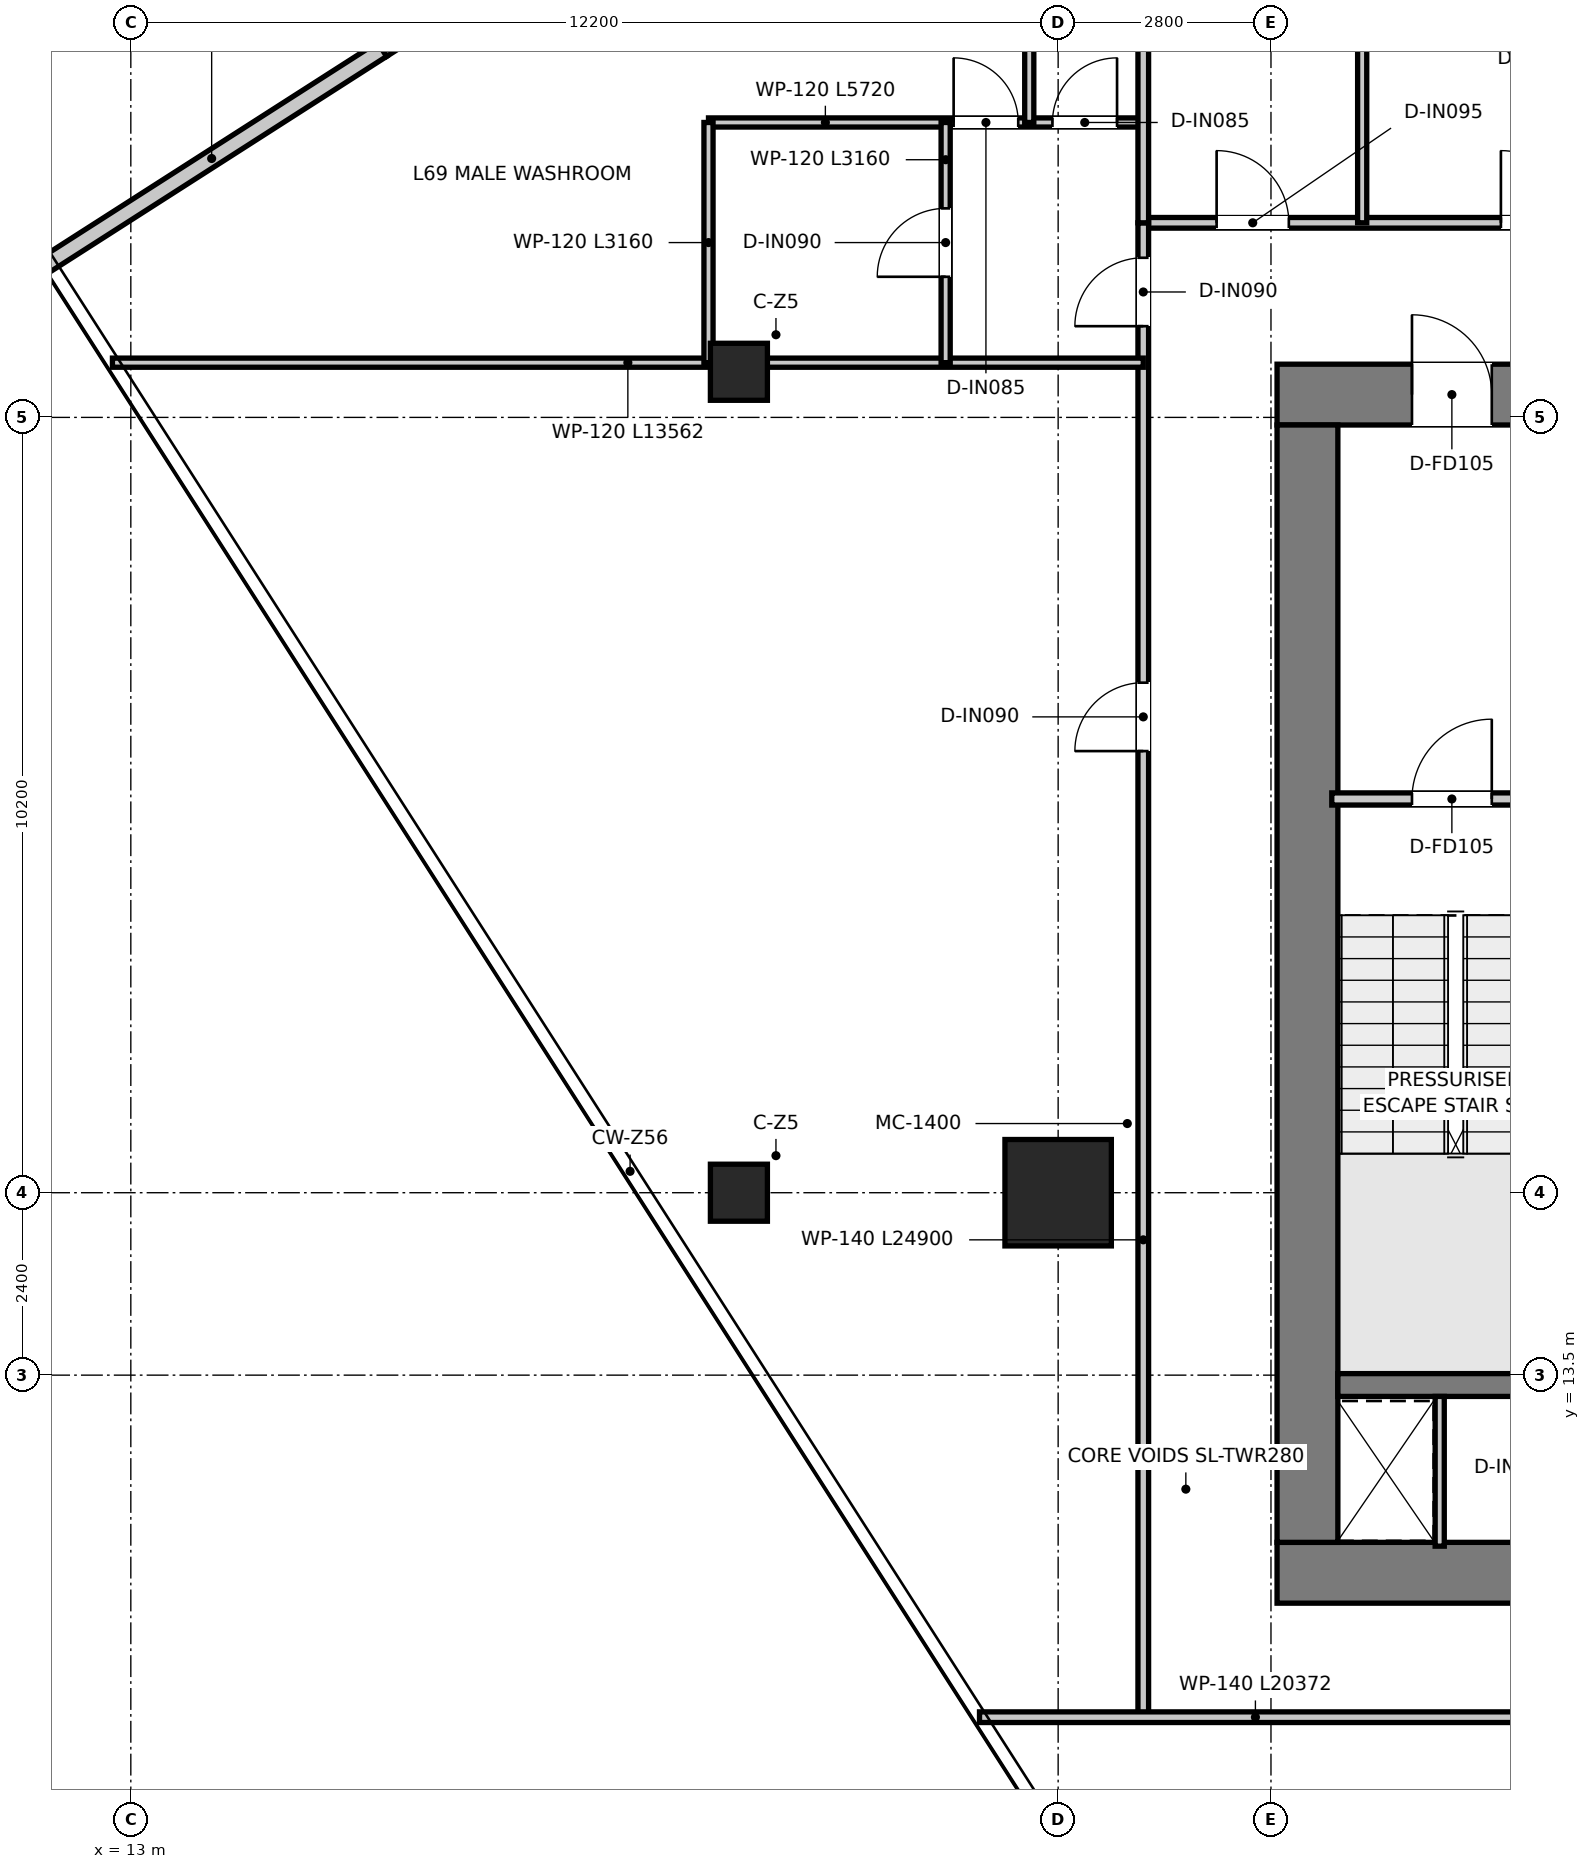
"""IFC4 building model, lengths in metres.
Left out: names, types, materials, properties, quantities, classifications, styles, units other than length and angle.
Written with IfcOpenShell. Run it as: python <this file> out.ifc"""

import sys

from ifc_helpers import new_model, si_unit, direction, frame, frame_2d, origin, origin_2d, place, context, subcontext, project, spatial, rectangle, extrude, source, transform, mapped, element, fill, save


model = new_model("IFC4")
c1 = context("Model", 3, precision=1e-05, world=origin(), true_north=direction((0.0, 1.0)))
c2 = subcontext(c1, "Body", "Model", "MODEL_VIEW")
j1 = project(units=[si_unit("LENGTHUNIT", "METRE"), si_unit("PLANEANGLEUNIT", "RADIAN")], contexts=[c1])
p1 = place(None, origin())
s1 = spatial("IfcSite", under=j1, at=p1, CompositionType="ELEMENT")
p2 = place(p1, origin())
s2 = spatial("IfcBuilding", under=s1, at=p2, CompositionType="ELEMENT")
p3 = place(p2, frame((0.0, 0.0, 283.2)))
s3 = spatial("IfcBuildingStorey", under=s2, at=p3, CompositionType="ELEMENT", Elevation=283.2)
p4 = place(p3, frame((28.08, 10.9, 0.0), z_axis=(0.0, 0.0, 1.0), x_axis=(1.0, 0.0, 0.0)))
e1 = element("IfcWall", 1, at=p4, inside=s3, PredefinedType="SHEAR", context=c2, shape_type="SweptSolid", body=[
    extrude(rectangle(XDim=15.84, YDim=0.8, at=frame_2d((7.92, 0.0))), origin(), (0.0, 0.0, 1.0), 3.95),
])
p5 = place(p3, frame((28.08, 26.4, 0.0), z_axis=(0.0, 0.0, 1.0), x_axis=(1.0, 0.0, 0.0)))
e2 = element("IfcWall", 2, at=p5, inside=s3, PredefinedType="SHEAR", context=c2, shape_type="SweptSolid", body=[
    extrude(rectangle(XDim=15.84, YDim=0.8, at=frame_2d((7.92, 0.0))), origin(), (0.0, 0.0, 1.0), 3.95),
])
p6 = place(p5, frame((7.22, 0.0, 0.0)))
e3 = element("IfcOpeningElement", 3, at=p6, cuts=e2, PredefinedType="OPENING", context=c2, shape_type="SweptSolid", body=[
    extrude(rectangle(XDim=1.4, YDim=2.2, at=frame_2d((0.7, 1.1))), frame((0.0, 0.41, 0.0), z_axis=(0.0, -1.0, 0.0), x_axis=(1.0, 0.0, 0.0)), (0.0, 0.0, 1.0), 0.82),
])
p7 = place(p5, frame((1.775, 0.0, 0.0)))
e4 = element("IfcOpeningElement", 4, at=p7, cuts=e2, PredefinedType="OPENING", context=c2, shape_type="SweptSolid", body=[
    extrude(rectangle(XDim=1.05, YDim=2.1, at=frame_2d((0.525, 1.05))), frame((0.0, 0.41, 0.0), z_axis=(0.0, -1.0, 0.0), x_axis=(1.0, 0.0, 0.0)), (0.0, 0.0, 1.0), 0.82),
])
p8 = place(p5, frame((13.015, 0.0, 0.0)))
e5 = element("IfcOpeningElement", 5, at=p8, cuts=e2, PredefinedType="OPENING", context=c2, shape_type="SweptSolid", body=[
    extrude(rectangle(XDim=1.05, YDim=2.1, at=frame_2d((0.525, 1.05))), frame((0.0, 0.41, 0.0), z_axis=(0.0, -1.0, 0.0), x_axis=(1.0, 0.0, 0.0)), (0.0, 0.0, 1.0), 0.82),
])
p9 = place(p3, frame((28.48, 11.3, 0.0), z_axis=(0.0, 0.0, 1.0), x_axis=(0.0, 1.0, 0.0)))
e6 = element("IfcWall", 6, at=p9, inside=s3, PredefinedType="SHEAR", context=c2, shape_type="SweptSolid", body=[
    extrude(rectangle(XDim=14.7, YDim=0.8, at=frame_2d((7.35, 0.0))), origin(), (0.0, 0.0, 1.0), 3.95),
])
p10 = place(p3, frame((28.88, 13.37, 0.0), z_axis=(0.0, 0.0, 1.0), x_axis=(1.0, 0.0, 0.0)))
e7 = element("IfcWall", 7, at=p10, inside=s3, PredefinedType="SHEAR", context=c2, shape_type="SweptSolid", body=[
    extrude(rectangle(XDim=3.1, YDim=0.3, at=frame_2d((1.55, 0.0))), origin(), (0.0, 0.0, 1.0), 3.95),
])
m1 = source(origin(), c2, "Body", "SweptSolid", [
    extrude(rectangle(XDim=1.4, YDim=1.4, at=origin_2d()), origin(), (0.0, 0.0, 1.0), 3.95),
])
p11 = place(p3, frame((25.2, 15.9, 0.0), z_axis=(0.0, 0.0, 1.0), x_axis=(1.0, 0.0, 0.0)))
e8 = element("IfcColumn", 8, at=p11, inside=s3, PredefinedType="USERDEFINED", context=c2, shape_type="MappedRepresentation", body=[
    mapped(m1, transform((0.0, 0.0, 0.0), x_axis=(1.0, 0.0, 0.0), y_axis=(0.0, 1.0, 0.0), z_axis=(0.0, 0.0, 1.0), scale=1.0)),
])
m2 = source(origin(), c2, "Body", "SweptSolid", [
    extrude(rectangle(XDim=0.75, YDim=0.75, at=origin_2d()), origin(), (0.0, 0.0, 1.0), 3.95),
])
for number, where, z_axis, x_axis in (
    (9, (21.0, 15.9, 0.0), (0.0, 0.0, 1.0), (1.0, 0.0, 0.0)),
    (10, (21.0, 26.7, 0.0), (0.0, 0.0, 1.0), (1.0, 0.0, 0.0)),
):
    element("IfcColumn", number, at=place(p3, frame(where, z_axis=z_axis, x_axis=x_axis)), inside=s3, PredefinedType="COLUMN", context=c2, shape_type="MappedRepresentation", body=[
        mapped(m2, transform((0.0, 0.0, 0.0), x_axis=(1.0, 0.0, 0.0), y_axis=(0.0, 1.0, 0.0), z_axis=(0.0, 0.0, 1.0), scale=1.0)),
    ])
p12 = place(p3, frame((13.468, 35.578, 0.0), z_axis=(0.0, 0.0, 1.0), x_axis=(0.539129907131, -0.842222620948, 0.0)))
e11 = element("IfcWall", 11, at=p12, inside=s3, PredefinedType="ELEMENTEDWALL", context=c2, shape_type="SweptSolid", body=[
    extrude(rectangle(XDim=5.545, YDim=0.22, at=frame_2d((2.772, 0.0))), origin(), (0.0, 0.0, 1.0), 3.67),
])
p13 = place(p3, frame((16.306, 30.941, 0.0), z_axis=(0.0, 0.0, 1.0), x_axis=(-0.84222560178, -0.539125250481, 0.0)))
e12 = element("IfcWall", 12, at=p13, inside=s3, PredefinedType="ELEMENTEDWALL", context=c2, shape_type="SweptSolid", body=[
    extrude(rectangle(XDim=5.325, YDim=0.22, at=frame_2d((2.663, 0.0))), origin(), (0.0, 0.0, 1.0), 3.67),
])
p14 = place(p3, frame((28.8, 21.08, 0.0), z_axis=(0.0, 0.0, 1.0), x_axis=(1.0, 0.0, 0.0)))
e13 = element("IfcWall", 13, at=p14, inside=s3, PredefinedType="PARTITIONING", context=c2, shape_type="SweptSolid", body=[
    extrude(rectangle(XDim=3.16, YDim=0.16, at=frame_2d((1.58, 0.0))), origin(), (0.0, 0.0, 1.0), 3.67),
])
p15 = place(p14, frame((1.055, 0.0, 0.0)))
e14 = element("IfcOpeningElement", 14, at=p15, cuts=e13, PredefinedType="OPENING", context=c2, shape_type="SweptSolid", body=[
    extrude(rectangle(XDim=1.05, YDim=2.1, at=frame_2d((0.525, 1.05))), frame((0.0, 0.09, 0.0), z_axis=(0.0, -1.0, 0.0), x_axis=(1.0, 0.0, 0.0)), (0.0, 0.0, 1.0), 0.18),
])
p16 = place(p3, frame((30.22, 11.25, 0.0), z_axis=(0.0, 0.0, 1.0), x_axis=(0.0, 1.0, 0.0)))
e15 = element("IfcWall", 15, at=p16, inside=s3, PredefinedType="PARTITIONING", context=c2, shape_type="SweptSolid", body=[
    extrude(rectangle(XDim=1.97, YDim=0.12, at=frame_2d((0.985, 0.0))), origin(), (0.0, 0.0, 1.0), 3.67),
])
p17 = place(p3, frame((26.32, 28.66, 0.0), z_axis=(0.0, 0.0, 1.0), x_axis=(1.0, 0.0, 0.0)))
e16 = element("IfcWall", 16, at=p17, inside=s3, PredefinedType="PARTITIONING", context=c2, shape_type="SweptSolid", body=[
    extrude(rectangle(XDim=19.36, YDim=0.14, at=frame_2d((9.68, 0.0))), origin(), (0.0, 0.0, 1.0), 3.18),
])
p18 = place(p17, frame((0.965, 0.0, 0.0)))
e17 = element("IfcOpeningElement", 17, at=p18, cuts=e16, PredefinedType="OPENING", context=c2, shape_type="SweptSolid", body=[
    extrude(rectangle(XDim=0.95, YDim=2.1, at=frame_2d((0.475, 1.05))), frame((0.0, 0.08, 0.0), z_axis=(0.0, -1.0, 0.0), x_axis=(1.0, 0.0, 0.0)), (0.0, 0.0, 1.0), 0.16),
])
p19 = place(p17, frame((4.705, 0.0, 0.0)))
e18 = element("IfcOpeningElement", 18, at=p19, cuts=e16, PredefinedType="OPENING", context=c2, shape_type="SweptSolid", body=[
    extrude(rectangle(XDim=0.95, YDim=2.1, at=frame_2d((0.475, 1.05))), frame((0.0, 0.08, 0.0), z_axis=(0.0, -1.0, 0.0), x_axis=(1.0, 0.0, 0.0)), (0.0, 0.0, 1.0), 0.16),
])
p20 = place(p17, frame((9.305, 0.0, 0.0)))
e19 = element("IfcOpeningElement", 19, at=p20, cuts=e16, PredefinedType="OPENING", context=c2, shape_type="SweptSolid", body=[
    extrude(rectangle(XDim=0.95, YDim=2.1, at=frame_2d((0.475, 1.05))), frame((0.0, 0.08, 0.0), z_axis=(0.0, -1.0, 0.0), x_axis=(1.0, 0.0, 0.0)), (0.0, 0.0, 1.0), 0.16),
])
p21 = place(p17, frame((13.805, 0.0, 0.0)))
e20 = element("IfcOpeningElement", 20, at=p21, cuts=e16, PredefinedType="OPENING", context=c2, shape_type="SweptSolid", body=[
    extrude(rectangle(XDim=0.95, YDim=2.1, at=frame_2d((0.475, 1.05))), frame((0.0, 0.08, 0.0), z_axis=(0.0, -1.0, 0.0), x_axis=(1.0, 0.0, 0.0)), (0.0, 0.0, 1.0), 0.16),
])
p22 = place(p17, frame((17.445, 0.0, 0.0)))
e21 = element("IfcOpeningElement", 21, at=p22, cuts=e16, PredefinedType="OPENING", context=c2, shape_type="SweptSolid", body=[
    extrude(rectangle(XDim=0.95, YDim=2.1, at=frame_2d((0.475, 1.05))), frame((0.0, 0.08, 0.0), z_axis=(0.0, -1.0, 0.0), x_axis=(1.0, 0.0, 0.0)), (0.0, 0.0, 1.0), 0.16),
])
p23 = place(p3, frame((26.32, 9.0, 0.0), z_axis=(0.0, 0.0, 1.0), x_axis=(0.0, 1.0, 0.0)))
e22 = element("IfcWall", 22, at=p23, inside=s3, PredefinedType="PARTITIONING", context=c2, shape_type="SweptSolid", body=[
    extrude(rectangle(XDim=19.66, YDim=0.14, at=frame_2d((9.83, 0.0))), origin(), (0.0, 0.0, 1.0), 3.13),
])
p24 = place(p23, frame((18.3, 0.0, 0.0)))
e23 = element("IfcOpeningElement", 23, at=p24, cuts=e22, PredefinedType="OPENING", context=c2, shape_type="SweptSolid", body=[
    extrude(rectangle(XDim=0.9, YDim=2.1, at=frame_2d((0.45, 1.05))), frame((0.0, 0.08, 0.0), z_axis=(0.0, -1.0, 0.0), x_axis=(1.0, 0.0, 0.0)), (0.0, 0.0, 1.0), 0.16),
])
p25 = place(p23, frame((12.71, 0.0, 0.0)))
e24 = element("IfcOpeningElement", 24, at=p25, cuts=e22, PredefinedType="OPENING", context=c2, shape_type="SweptSolid", body=[
    extrude(rectangle(XDim=0.9, YDim=2.1, at=frame_2d((0.45, 1.05))), frame((0.0, 0.08, 0.0), z_axis=(0.0, -1.0, 0.0), x_axis=(1.0, 0.0, 0.0)), (0.0, 0.0, 1.0), 0.16),
])
p26 = place(p3, frame((24.166, 9.0, 0.0), z_axis=(0.0, 0.0, 1.0), x_axis=(1.0, 0.0, 0.0)))
e25 = element("IfcWall", 25, at=p26, inside=s3, PredefinedType="PARTITIONING", context=c2, shape_type="SweptSolid", body=[
    extrude(rectangle(XDim=20.372, YDim=0.14, at=frame_2d((10.186, 0.0))), origin(), (0.0, 0.0, 1.0), 3.67),
])
p27 = place(p26, frame((7.409, 0.0, 0.0)))
e26 = element("IfcOpeningElement", 26, at=p27, cuts=e25, PredefinedType="OPENING", context=c2, shape_type="SweptSolid", body=[
    extrude(rectangle(XDim=0.85, YDim=2.1, at=frame_2d((0.425, 1.05))), frame((0.0, 0.08, 0.0), z_axis=(0.0, -1.0, 0.0), x_axis=(1.0, 0.0, 0.0)), (0.0, 0.0, 1.0), 0.16),
])
p28 = place(p26, frame((15.409, 0.0, 0.0)))
e27 = element("IfcOpeningElement", 27, at=p28, cuts=e25, PredefinedType="OPENING", context=c2, shape_type="SweptSolid", body=[
    extrude(rectangle(XDim=0.85, YDim=2.1, at=frame_2d((0.425, 1.05))), frame((0.0, 0.08, 0.0), z_axis=(0.0, -1.0, 0.0), x_axis=(1.0, 0.0, 0.0)), (0.0, 0.0, 1.0), 0.16),
])
p29 = place(p3, frame((12.758, 26.82, 0.0), z_axis=(0.0, 0.0, 1.0), x_axis=(1.0, 0.0, 0.0)))
e28 = element("IfcWall", 28, at=p29, inside=s3, PredefinedType="PARTITIONING", context=c2, shape_type="SweptSolid", body=[
    extrude(rectangle(XDim=13.562, YDim=0.12, at=frame_2d((6.781, 0.0))), origin(), (0.0, 0.0, 1.0), 3.13),
])
p30 = place(p3, frame((20.6, 29.98, 0.0), z_axis=(0.0, 0.0, 1.0), x_axis=(1.0, 0.0, 0.0)))
e29 = element("IfcWall", 29, at=p30, inside=s3, PredefinedType="PARTITIONING", context=c2, shape_type="SweptSolid", body=[
    extrude(rectangle(XDim=5.72, YDim=0.12, at=frame_2d((2.86, 0.0))), origin(), (0.0, 0.0, 1.0), 3.13),
])
p31 = place(p30, frame((3.225, 0.0, 0.0)))
e30 = element("IfcOpeningElement", 30, at=p31, cuts=e29, PredefinedType="OPENING", context=c2, shape_type="SweptSolid", body=[
    extrude(rectangle(XDim=0.85, YDim=2.1, at=frame_2d((0.425, 1.05))), frame((0.0, 0.07, 0.0), z_axis=(0.0, -1.0, 0.0), x_axis=(1.0, 0.0, 0.0)), (0.0, 0.0, 1.0), 0.14),
])
p32 = place(p30, frame((4.525, 0.0, 0.0)))
e31 = element("IfcOpeningElement", 31, at=p32, cuts=e29, PredefinedType="OPENING", context=c2, shape_type="SweptSolid", body=[
    extrude(rectangle(XDim=0.85, YDim=2.1, at=frame_2d((0.425, 1.05))), frame((0.0, 0.07, 0.0), z_axis=(0.0, -1.0, 0.0), x_axis=(1.0, 0.0, 0.0)), (0.0, 0.0, 1.0), 0.14),
])
p33 = place(p3, frame((20.6, 26.82, 0.0), z_axis=(0.0, 0.0, 1.0), x_axis=(0.0, 1.0, 0.0)))
e32 = element("IfcWall", 32, at=p33, inside=s3, PredefinedType="PARTITIONING", context=c2, shape_type="SweptSolid", body=[
    extrude(rectangle(XDim=3.16, YDim=0.12, at=frame_2d((1.58, 0.0))), origin(), (0.0, 0.0, 1.0), 3.67),
])
p34 = place(p3, frame((23.72, 26.82, 0.0), z_axis=(0.0, 0.0, 1.0), x_axis=(0.0, 1.0, 0.0)))
e33 = element("IfcWall", 33, at=p34, inside=s3, PredefinedType="PARTITIONING", context=c2, shape_type="SweptSolid", body=[
    extrude(rectangle(XDim=3.16, YDim=0.12, at=frame_2d((1.58, 0.0))), origin(), (0.0, 0.0, 1.0), 3.18),
])
p35 = place(p34, frame((1.13, 0.0, 0.0)))
e34 = element("IfcOpeningElement", 34, at=p35, cuts=e33, PredefinedType="OPENING", context=c2, shape_type="SweptSolid", body=[
    extrude(rectangle(XDim=0.9, YDim=2.1, at=frame_2d((0.45, 1.05))), frame((0.0, 0.07, 0.0), z_axis=(0.0, -1.0, 0.0), x_axis=(1.0, 0.0, 0.0)), (0.0, 0.0, 1.0), 0.14),
])
p36 = place(p3, frame((24.82, 29.98, 0.0), z_axis=(0.0, 0.0, 1.0), x_axis=(0.0, 1.0, 0.0)))
e35 = element("IfcWall", 35, at=p36, inside=s3, PredefinedType="PARTITIONING", context=c2, shape_type="SweptSolid", body=[
    extrude(rectangle(XDim=3.92, YDim=0.12, at=frame_2d((1.96, 0.0))), origin(), (0.0, 0.0, 1.0), 3.31),
])
p37 = place(p3, frame((26.32, 28.66, 0.0), z_axis=(0.0, 0.0, 1.0), x_axis=(0.0, 1.0, 0.0)))
e36 = element("IfcWall", 36, at=p37, inside=s3, PredefinedType="PARTITIONING", context=c2, shape_type="SweptSolid", body=[
    extrude(rectangle(XDim=5.24, YDim=0.14, at=frame_2d((2.62, 0.0))), origin(), (0.0, 0.0, 1.0), 3.43),
])
p38 = place(p3, frame((29.2, 28.66, 0.0), z_axis=(0.0, 0.0, 1.0), x_axis=(0.0, 1.0, 0.0)))
e37 = element("IfcWall", 37, at=p38, inside=s3, PredefinedType="PARTITIONING", context=c2, shape_type="SweptSolid", body=[
    extrude(rectangle(XDim=16.852, YDim=0.12, at=frame_2d((8.426, 0.0))), origin(), (0.0, 0.0, 1.0), 3.13),
])
p39 = place(p15, origin())
e38 = element("IfcDoor", 38, at=p39, inside=s3, OperationType="SINGLE_SWING_RIGHT", PredefinedType="DOOR", context=c2, shape_type="SweptSolid", body=[
    extrude(rectangle(XDim=1.05, YDim=2.1, at=frame_2d((0.525, 1.05))), frame((0.0, 0.025, 0.0), z_axis=(0.0, -1.0, 0.0), x_axis=(1.0, 0.0, 0.0)), (0.0, 0.0, 1.0), 0.05),
])
fill(e14, e38)
p40 = place(p7, origin())
e39 = element("IfcDoor", 39, at=p40, inside=s3, OperationType="SINGLE_SWING_LEFT", PredefinedType="DOOR", context=c2, shape_type="SweptSolid", body=[
    extrude(rectangle(XDim=1.05, YDim=2.1, at=frame_2d((0.525, 1.05))), frame((0.0, 0.025, 0.0), z_axis=(0.0, -1.0, 0.0), x_axis=(1.0, 0.0, 0.0)), (0.0, 0.0, 1.0), 0.05),
])
fill(e4, e39)
p41 = place(p24, origin())
e40 = element("IfcDoor", 40, at=p41, inside=s3, OperationType="SINGLE_SWING_LEFT", PredefinedType="DOOR", context=c2, shape_type="SweptSolid", body=[
    extrude(rectangle(XDim=0.9, YDim=2.1, at=frame_2d((0.45, 1.05))), frame((0.0, 0.025, 0.0), z_axis=(0.0, -1.0, 0.0), x_axis=(1.0, 0.0, 0.0)), (0.0, 0.0, 1.0), 0.05),
])
fill(e23, e40)
p42 = place(p31, origin())
e41 = element("IfcDoor", 41, at=p42, inside=s3, OperationType="SINGLE_SWING_LEFT", PredefinedType="DOOR", context=c2, shape_type="SweptSolid", body=[
    extrude(rectangle(XDim=0.85, YDim=2.1, at=frame_2d((0.425, 1.05))), frame((0.0, 0.025, 0.0), z_axis=(0.0, -1.0, 0.0), x_axis=(1.0, 0.0, 0.0)), (0.0, 0.0, 1.0), 0.05),
])
fill(e30, e41)
p43 = place(p32, origin())
e42 = element("IfcDoor", 42, at=p43, inside=s3, OperationType="SINGLE_SWING_RIGHT", PredefinedType="DOOR", context=c2, shape_type="SweptSolid", body=[
    extrude(rectangle(XDim=0.85, YDim=2.1, at=frame_2d((0.425, 1.05))), frame((0.0, 0.025, 0.0), z_axis=(0.0, -1.0, 0.0), x_axis=(1.0, 0.0, 0.0)), (0.0, 0.0, 1.0), 0.05),
])
fill(e31, e42)
p44 = place(p35, origin())
e43 = element("IfcDoor", 43, at=p44, inside=s3, OperationType="SINGLE_SWING_LEFT", PredefinedType="DOOR", context=c2, shape_type="SweptSolid", body=[
    extrude(rectangle(XDim=0.9, YDim=2.1, at=frame_2d((0.45, 1.05))), frame((0.0, 0.025, 0.0), z_axis=(0.0, -1.0, 0.0), x_axis=(1.0, 0.0, 0.0)), (0.0, 0.0, 1.0), 0.05),
])
fill(e34, e43)
p45 = place(p18, origin())
e44 = element("IfcDoor", 44, at=p45, inside=s3, OperationType="SINGLE_SWING_LEFT", PredefinedType="DOOR", context=c2, shape_type="SweptSolid", body=[
    extrude(rectangle(XDim=0.95, YDim=2.1, at=frame_2d((0.475, 1.05))), frame((0.0, 0.025, 0.0), z_axis=(0.0, -1.0, 0.0), x_axis=(1.0, 0.0, 0.0)), (0.0, 0.0, 1.0), 0.05),
])
fill(e17, e44)
p46 = place(p19, origin())
e45 = element("IfcDoor", 45, at=p46, inside=s3, OperationType="SINGLE_SWING_LEFT", PredefinedType="DOOR", context=c2, shape_type="SweptSolid", body=[
    extrude(rectangle(XDim=0.95, YDim=2.1, at=frame_2d((0.475, 1.05))), frame((0.0, 0.025, 0.0), z_axis=(0.0, -1.0, 0.0), x_axis=(1.0, 0.0, 0.0)), (0.0, 0.0, 1.0), 0.05),
])
fill(e18, e45)
p47 = place(p25, origin())
e46 = element("IfcDoor", 46, at=p47, inside=s3, OperationType="SINGLE_SWING_LEFT", PredefinedType="DOOR", context=c2, shape_type="SweptSolid", body=[
    extrude(rectangle(XDim=0.9, YDim=2.1, at=frame_2d((0.45, 1.05))), frame((0.0, 0.025, 0.0), z_axis=(0.0, -1.0, 0.0), x_axis=(1.0, 0.0, 0.0)), (0.0, 0.0, 1.0), 0.05),
])
fill(e24, e46)
save(model, sys.argv[1])
